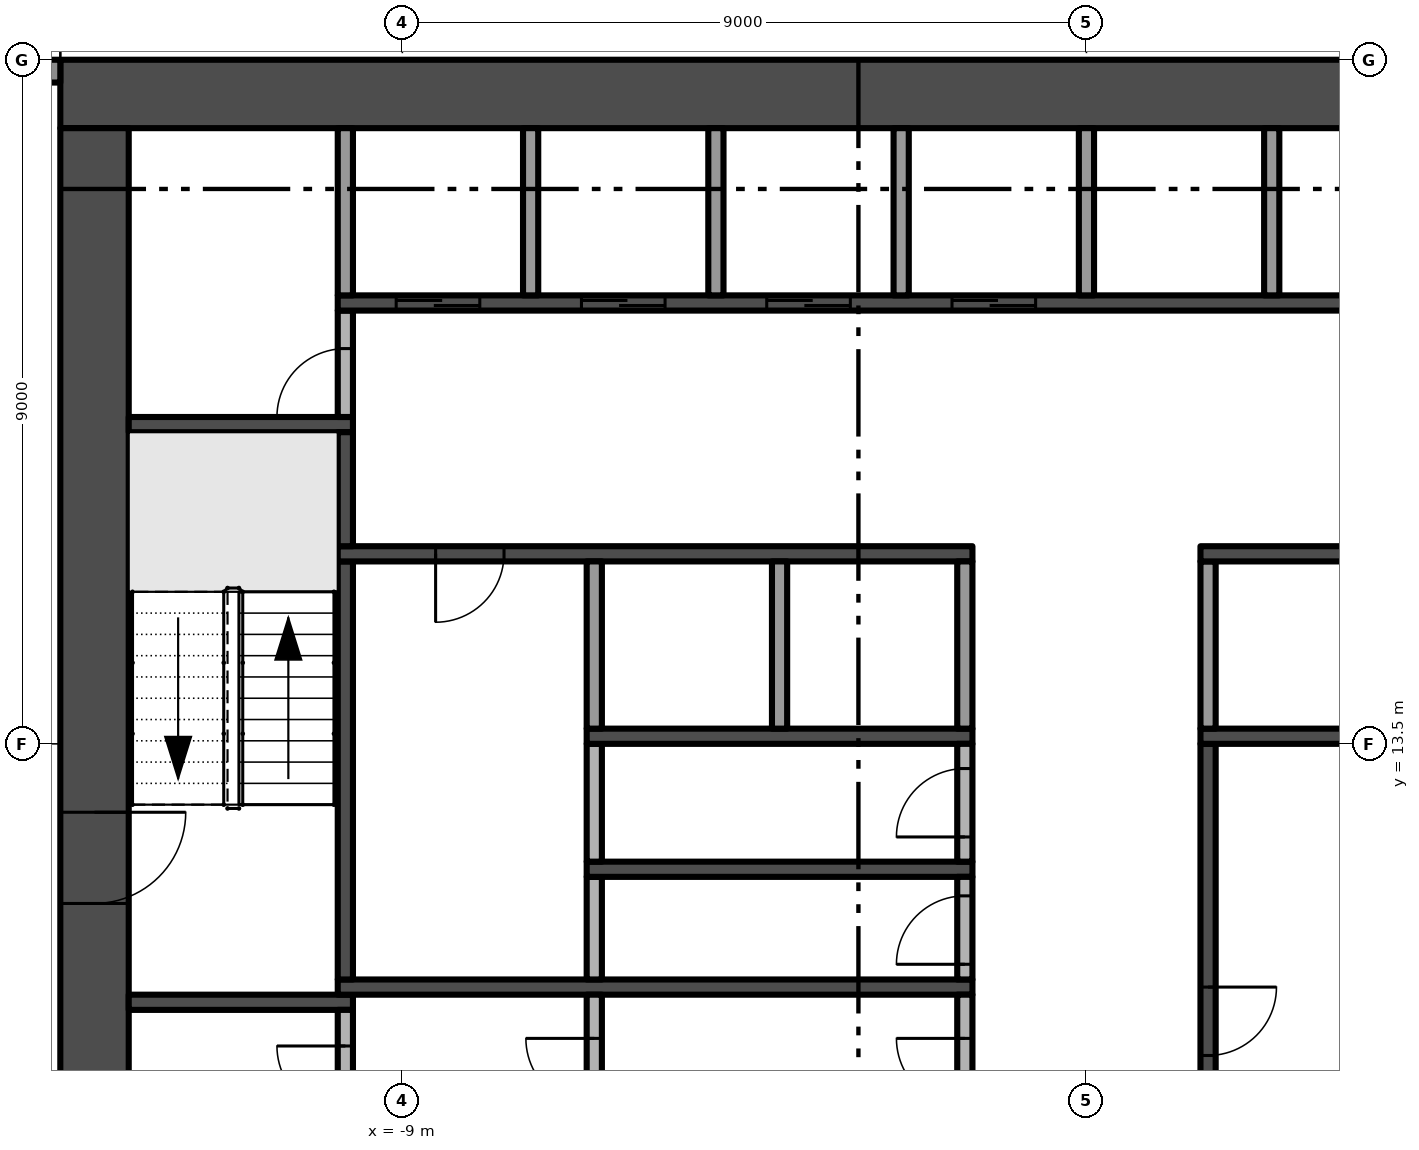
"""IFC4 building model, lengths in metres.
Left out: names, types, materials, properties, quantities, classifications, styles, units other than length and angle.
Written with IfcOpenShell. Run it as: python <this file> out.ifc"""

import sys

from ifc_helpers import new_model, si_unit, direction, frame, frame_2d, origin, place, context, subcontext, project, spatial, rectangle, extrude, element, fill, save


model = new_model("IFC4")
c1 = context("Model", 3, precision=1e-05, world=origin(), true_north=direction((0.0, 1.0)))
c2 = subcontext(c1, "Body", "Model", "MODEL_VIEW")
j1 = project(units=[si_unit("LENGTHUNIT", "METRE"), si_unit("PLANEANGLEUNIT", "RADIAN")], contexts=[c1])
p1 = place(None, origin())
s1 = spatial("IfcSite", under=j1, at=p1, CompositionType="ELEMENT")
p2 = place(p1, origin())
s2 = spatial("IfcBuilding", under=s1, at=p2, CompositionType="ELEMENT")
p3 = place(p2, frame((0.0, 0.0, 88.4)))
s3 = spatial("IfcBuildingStorey", under=s2, at=p3, CompositionType="ELEMENT", Elevation=88.4)
p4 = place(p3, frame((13.5, 22.05, -0.3), z_axis=(0.0, 0.0, 1.0), x_axis=(-1.0, 0.0, 0.0)))
e1 = element("IfcWall", 1, at=p4, inside=s3, PredefinedType="SHEAR", context=c2, shape_type="SweptSolid", body=[
    extrude(rectangle(XDim=27.0, YDim=0.9, at=frame_2d((13.5, 0.0))), origin(), (0.0, 0.0, 1.0), 3.8),
])
p5 = place(p3, frame((-13.05, 21.6, -0.3), z_axis=(0.0, 0.0, 1.0), x_axis=(0.0, -1.0, 0.0)))
e2 = element("IfcWall", 2, at=p5, inside=s3, PredefinedType="SHEAR", context=c2, shape_type="SweptSolid", body=[
    extrude(rectangle(XDim=16.2, YDim=0.9, at=frame_2d((8.1, 0.0))), origin(), (0.0, 0.0, 1.0), 3.8),
])
p6 = place(p5, frame((9.0, 0.0, 0.3)))
e3 = element("IfcOpeningElement", 3, at=p6, cuts=e2, PredefinedType="OPENING", context=c2, shape_type="SweptSolid", body=[
    extrude(rectangle(XDim=1.2, YDim=2.2, at=frame_2d((0.6, 1.1))), frame((0.0, 0.46, 0.0), z_axis=(0.0, -1.0, 0.0), x_axis=(1.0, 0.0, 0.0)), (0.0, 0.0, 1.0), 0.92),
])
p7 = place(p3, frame((-17.35, 22.35, 0.0), z_axis=(0.0, 0.0, 1.0), x_axis=(1.0, 0.0, 0.0)))
e4 = element("IfcWall", 4, at=p7, inside=s3, PredefinedType="SOLIDWALL", context=c2, shape_type="SweptSolid", body=[
    extrude(rectangle(XDim=3.85, YDim=0.3, at=frame_2d((1.925, 0.0))), origin(), (0.0, 0.0, 1.0), 3.5),
])
p8 = place(p7, frame((0.675, 0.0, 0.0)))
e5 = element("IfcOpeningElement", 5, at=p8, cuts=e4, PredefinedType="OPENING", context=c2, shape_type="SweptSolid", body=[
    extrude(rectangle(XDim=2.4, YDim=2.4, at=frame_2d((1.2, 1.2))), frame((0.0, 0.16, 0.0), z_axis=(0.0, -1.0, 0.0), x_axis=(1.0, 0.0, 0.0)), (0.0, 0.0, 1.0), 0.32),
])
for number, where, z_axis, x_axis in (
    (6, (-12.6, 10.1, 0.0), (0.0, 0.0, 1.0), (1.0, 0.0, 0.0)),
    (7, (-12.6, 17.7, 0.0), (0.0, 0.0, 1.0), (1.0, 0.0, 0.0)),
):
    element("IfcWall", number, at=place(p3, frame(where, z_axis=z_axis, x_axis=x_axis)), inside=s3, PredefinedType="SHEAR", context=c2, shape_type="SweptSolid", body=[
        extrude(rectangle(XDim=2.95, YDim=0.2, at=frame_2d((1.475, 0.0))), origin(), (0.0, 0.0, 1.0), 3.5),
    ])
p9 = place(p3, frame((-9.75, 8.15, 0.0), z_axis=(0.0, 0.0, 1.0), x_axis=(0.0, 1.0, 0.0)))
e8 = element("IfcWall", 8, at=p9, inside=s3, PredefinedType="PARTITIONING", context=c2, shape_type="SweptSolid", body=[
    extrude(rectangle(XDim=1.85, YDim=0.2, at=frame_2d((0.925, 0.0))), origin(), (0.0, 0.0, 1.0), 3.5),
])
p10 = place(p9, frame((0.475, 0.0, 0.0)))
e9 = element("IfcOpeningElement", 9, at=p10, cuts=e8, PredefinedType="OPENING", context=c2, shape_type="SweptSolid", body=[
    extrude(rectangle(XDim=0.9, YDim=2.1, at=frame_2d((0.45, 1.05))), frame((0.0, 0.11, 0.0), z_axis=(0.0, -1.0, 0.0), x_axis=(1.0, 0.0, 0.0)), (0.0, 0.0, 1.0), 0.22),
])
p11 = place(p3, frame((-9.85, 10.3, 0.0), z_axis=(0.0, 0.0, 1.0), x_axis=(1.0, 0.0, 0.0)))
e10 = element("IfcWall", 10, at=p11, inside=s3, PredefinedType="SHEAR", context=c2, shape_type="SweptSolid", body=[
    extrude(rectangle(XDim=8.35, YDim=0.2, at=frame_2d((4.175, 0.0))), origin(), (0.0, 0.0, 1.0), 3.5),
])
p12 = place(p3, frame((-9.75, 10.4, 0.0), z_axis=(0.0, 0.0, 1.0), x_axis=(0.0, 1.0, 0.0)))
e11 = element("IfcWall", 11, at=p12, inside=s3, PredefinedType="SHEAR", context=c2, shape_type="SweptSolid", body=[
    extrude(rectangle(XDim=5.5, YDim=0.2, at=frame_2d((2.75, 0.0))), origin(), (0.0, 0.0, 1.0), 3.5),
])
p13 = place(p3, frame((-1.5, 16.0, 0.0), z_axis=(0.0, 0.0, 1.0), x_axis=(-1.0, 0.0, 0.0)))
e12 = element("IfcWall", 12, at=p13, inside=s3, PredefinedType="SHEAR", context=c2, shape_type="SweptSolid", body=[
    extrude(rectangle(XDim=8.35, YDim=0.2, at=frame_2d((4.175, 0.0))), origin(), (0.0, 0.0, 1.0), 3.5),
])
p14 = place(p13, frame((6.162, 0.0, 0.0)))
e13 = element("IfcOpeningElement", 13, at=p14, cuts=e12, PredefinedType="OPENING", context=c2, shape_type="SweptSolid", body=[
    extrude(rectangle(XDim=0.9, YDim=2.1, at=frame_2d((0.45, 1.05))), frame((0.0, 0.11, 0.0), z_axis=(0.0, -1.0, 0.0), x_axis=(1.0, 0.0, 0.0)), (0.0, 0.0, 1.0), 0.22),
])
p15 = place(p3, frame((-9.75, 16.1, 0.0), z_axis=(0.0, 0.0, 1.0), x_axis=(0.0, 1.0, 0.0)))
e14 = element("IfcWall", 14, at=p15, inside=s3, PredefinedType="SHEAR", context=c2, shape_type="SweptSolid", body=[
    extrude(rectangle(XDim=1.5, YDim=0.2, at=frame_2d((0.75, 0.0))), origin(), (0.0, 0.0, 1.0), 3.5),
])
p16 = place(p3, frame((-9.75, 17.8, 0.0), z_axis=(0.0, 0.0, 1.0), x_axis=(0.0, 1.0, 0.0)))
e15 = element("IfcWall", 15, at=p16, inside=s3, PredefinedType="PARTITIONING", context=c2, shape_type="SweptSolid", body=[
    extrude(rectangle(XDim=1.4, YDim=0.2, at=frame_2d((0.7, 0.0))), origin(), (0.0, 0.0, 1.0), 3.5),
])
p17 = place(p16, origin())
e16 = element("IfcOpeningElement", 16, at=p17, cuts=e15, PredefinedType="OPENING", context=c2, shape_type="SweptSolid", body=[
    extrude(rectangle(XDim=0.9, YDim=2.1, at=frame_2d((0.45, 1.05))), frame((0.0, 0.11, 0.0), z_axis=(0.0, -1.0, 0.0), x_axis=(1.0, 0.0, 0.0)), (0.0, 0.0, 1.0), 0.22),
])
p18 = place(p3, frame((-9.85, 19.3, 0.0), z_axis=(0.0, 0.0, 1.0), x_axis=(1.0, 0.0, 0.0)))
e17 = element("IfcWall", 17, at=p18, inside=s3, PredefinedType="SHEAR", context=c2, shape_type="SweptSolid", body=[
    extrude(rectangle(XDim=19.7, YDim=0.2, at=frame_2d((9.85, 0.0))), origin(), (0.0, 0.0, 1.0), 3.5),
])
p19 = place(p18, frame((0.769, 0.0, 0.0)))
e18 = element("IfcOpeningElement", 18, at=p19, cuts=e17, PredefinedType="OPENING", context=c2, shape_type="SweptSolid", body=[
    extrude(rectangle(XDim=1.1, YDim=2.1, at=frame_2d((0.55, 1.05))), frame((0.0, 0.11, 0.0), z_axis=(0.0, -1.0, 0.0), x_axis=(1.0, 0.0, 0.0)), (0.0, 0.0, 1.0), 0.22),
])
p20 = place(p18, frame((3.206, 0.0, 0.0)))
e19 = element("IfcOpeningElement", 19, at=p20, cuts=e17, PredefinedType="OPENING", context=c2, shape_type="SweptSolid", body=[
    extrude(rectangle(XDim=1.1, YDim=2.1, at=frame_2d((0.55, 1.05))), frame((0.0, 0.11, 0.0), z_axis=(0.0, -1.0, 0.0), x_axis=(1.0, 0.0, 0.0)), (0.0, 0.0, 1.0), 0.22),
])
p21 = place(p18, frame((5.644, 0.0, 0.0)))
e20 = element("IfcOpeningElement", 20, at=p21, cuts=e17, PredefinedType="OPENING", context=c2, shape_type="SweptSolid", body=[
    extrude(rectangle(XDim=1.1, YDim=2.1, at=frame_2d((0.55, 1.05))), frame((0.0, 0.11, 0.0), z_axis=(0.0, -1.0, 0.0), x_axis=(1.0, 0.0, 0.0)), (0.0, 0.0, 1.0), 0.22),
])
p22 = place(p18, frame((8.081, 0.0, 0.0)))
e21 = element("IfcOpeningElement", 21, at=p22, cuts=e17, PredefinedType="OPENING", context=c2, shape_type="SweptSolid", body=[
    extrude(rectangle(XDim=1.1, YDim=2.1, at=frame_2d((0.55, 1.05))), frame((0.0, 0.11, 0.0), z_axis=(0.0, -1.0, 0.0), x_axis=(1.0, 0.0, 0.0)), (0.0, 0.0, 1.0), 0.22),
])
for number, where, z_axis, x_axis in (
    (22, (-9.75, 19.4, 0.0), (0.0, 0.0, 1.0), (0.0, 1.0, 0.0)),
    (23, (-7.312, 19.4, 0.0), (0.0, 0.0, 1.0), (0.0, 1.0, 0.0)),
):
    element("IfcWall", number, at=place(p3, frame(where, z_axis=z_axis, x_axis=x_axis)), inside=s3, PredefinedType="PARTITIONING", context=c2, shape_type="SweptSolid", body=[
        extrude(rectangle(XDim=2.2, YDim=0.2, at=frame_2d((1.1, 0.0))), origin(), (0.0, 0.0, 1.0), 3.5),
    ])
p23 = place(p3, frame((-6.475, 8.15, 0.0), z_axis=(0.0, 0.0, 1.0), x_axis=(0.0, 1.0, 0.0)))
e24 = element("IfcWall", 24, at=p23, inside=s3, PredefinedType="PARTITIONING", context=c2, shape_type="SweptSolid", body=[
    extrude(rectangle(XDim=2.05, YDim=0.2, at=frame_2d((1.025, 0.0))), origin(), (0.0, 0.0, 1.0), 3.5),
])
p24 = place(p23, frame((0.575, 0.0, 0.0)))
e25 = element("IfcOpeningElement", 25, at=p24, cuts=e24, PredefinedType="OPENING", context=c2, shape_type="SweptSolid", body=[
    extrude(rectangle(XDim=0.9, YDim=2.1, at=frame_2d((0.45, 1.05))), frame((0.0, 0.11, 0.0), z_axis=(0.0, -1.0, 0.0), x_axis=(1.0, 0.0, 0.0)), (0.0, 0.0, 1.0), 0.22),
])
p25 = place(p3, frame((-6.475, 10.4, 0.0), z_axis=(0.0, 0.0, 1.0), x_axis=(0.0, 1.0, 0.0)))
e26 = element("IfcWall", 26, at=p25, inside=s3, PredefinedType="PARTITIONING", context=c2, shape_type="SweptSolid", body=[
    extrude(rectangle(XDim=1.35, YDim=0.2, at=frame_2d((0.675, 0.0))), origin(), (0.0, 0.0, 1.0), 3.5),
])
p26 = place(p3, frame((-6.575, 11.85, 0.0), z_axis=(0.0, 0.0, 1.0), x_axis=(1.0, 0.0, 0.0)))
e27 = element("IfcWall", 27, at=p26, inside=s3, PredefinedType="SHEAR", context=c2, shape_type="SweptSolid", body=[
    extrude(rectangle(XDim=5.075, YDim=0.2, at=frame_2d((2.538, 0.0))), origin(), (0.0, 0.0, 1.0), 3.5),
])
p27 = place(p3, frame((-6.475, 11.95, 0.0), z_axis=(0.0, 0.0, 1.0), x_axis=(0.0, 1.0, 0.0)))
e28 = element("IfcWall", 28, at=p27, inside=s3, PredefinedType="PARTITIONING", context=c2, shape_type="SweptSolid", body=[
    extrude(rectangle(XDim=1.55, YDim=0.2, at=frame_2d((0.775, 0.0))), origin(), (0.0, 0.0, 1.0), 3.5),
])
p28 = place(p3, frame((-6.575, 13.6, 0.0), z_axis=(0.0, 0.0, 1.0), x_axis=(1.0, 0.0, 0.0)))
e29 = element("IfcWall", 29, at=p28, inside=s3, PredefinedType="SHEAR", context=c2, shape_type="SweptSolid", body=[
    extrude(rectangle(XDim=5.075, YDim=0.2, at=frame_2d((2.538, 0.0))), origin(), (0.0, 0.0, 1.0), 3.5),
])
for number, where, z_axis, x_axis in (
    (30, (-6.475, 13.7, 0.0), (0.0, 0.0, 1.0), (0.0, 1.0, 0.0)),
    (31, (-4.875, 19.4, 0.0), (0.0, 0.0, 1.0), (0.0, 1.0, 0.0)),
    (32, (-4.037, 13.7, 0.0), (0.0, 0.0, 1.0), (0.0, 1.0, 0.0)),
    (33, (-2.438, 19.4, 0.0), (0.0, 0.0, 1.0), (0.0, 1.0, 0.0)),
):
    element("IfcWall", number, at=place(p3, frame(where, z_axis=z_axis, x_axis=x_axis)), inside=s3, PredefinedType="PARTITIONING", context=c2, shape_type="SweptSolid", body=[
        extrude(rectangle(XDim=2.2, YDim=0.2, at=frame_2d((1.1, 0.0))), origin(), (0.0, 0.0, 1.0), 3.5),
    ])
p29 = place(p3, frame((-1.6, 8.15, 0.0), z_axis=(0.0, 0.0, 1.0), x_axis=(0.0, 1.0, 0.0)))
e34 = element("IfcWall", 34, at=p29, inside=s3, PredefinedType="PARTITIONING", context=c2, shape_type="SweptSolid", body=[
    extrude(rectangle(XDim=2.05, YDim=0.2, at=frame_2d((1.025, 0.0))), origin(), (0.0, 0.0, 1.0), 3.5),
])
p30 = place(p29, frame((0.575, 0.0, 0.0)))
e35 = element("IfcOpeningElement", 35, at=p30, cuts=e34, PredefinedType="OPENING", context=c2, shape_type="SweptSolid", body=[
    extrude(rectangle(XDim=0.9, YDim=2.1, at=frame_2d((0.45, 1.05))), frame((0.0, 0.11, 0.0), z_axis=(0.0, -1.0, 0.0), x_axis=(1.0, 0.0, 0.0)), (0.0, 0.0, 1.0), 0.22),
])
p31 = place(p3, frame((-1.6, 10.4, 0.0), z_axis=(0.0, 0.0, 1.0), x_axis=(0.0, 1.0, 0.0)))
e36 = element("IfcWall", 36, at=p31, inside=s3, PredefinedType="PARTITIONING", context=c2, shape_type="SweptSolid", body=[
    extrude(rectangle(XDim=1.35, YDim=0.2, at=frame_2d((0.675, 0.0))), origin(), (0.0, 0.0, 1.0), 3.5),
])
p32 = place(p31, frame((0.2, 0.0, 0.0)))
e37 = element("IfcOpeningElement", 37, at=p32, cuts=e36, PredefinedType="OPENING", context=c2, shape_type="SweptSolid", body=[
    extrude(rectangle(XDim=0.9, YDim=2.1, at=frame_2d((0.45, 1.05))), frame((0.0, 0.11, 0.0), z_axis=(0.0, -1.0, 0.0), x_axis=(1.0, 0.0, 0.0)), (0.0, 0.0, 1.0), 0.22),
])
p33 = place(p3, frame((-1.6, 11.95, 0.0), z_axis=(0.0, 0.0, 1.0), x_axis=(0.0, 1.0, 0.0)))
e38 = element("IfcWall", 38, at=p33, inside=s3, PredefinedType="PARTITIONING", context=c2, shape_type="SweptSolid", body=[
    extrude(rectangle(XDim=1.55, YDim=0.2, at=frame_2d((0.775, 0.0))), origin(), (0.0, 0.0, 1.0), 3.5),
])
p34 = place(p33, frame((0.325, 0.0, 0.0)))
e39 = element("IfcOpeningElement", 39, at=p34, cuts=e38, PredefinedType="OPENING", context=c2, shape_type="SweptSolid", body=[
    extrude(rectangle(XDim=0.9, YDim=2.1, at=frame_2d((0.45, 1.05))), frame((0.0, 0.11, 0.0), z_axis=(0.0, -1.0, 0.0), x_axis=(1.0, 0.0, 0.0)), (0.0, 0.0, 1.0), 0.22),
])
for number, where, z_axis, x_axis in (
    (40, (-1.6, 13.7, 0.0), (0.0, 0.0, 1.0), (0.0, 1.0, 0.0)),
    (41, (0.0, 19.4, 0.0), (0.0, 0.0, 1.0), (0.0, 1.0, 0.0)),
):
    element("IfcWall", number, at=place(p3, frame(where, z_axis=z_axis, x_axis=x_axis)), inside=s3, PredefinedType="PARTITIONING", context=c2, shape_type="SweptSolid", body=[
        extrude(rectangle(XDim=2.2, YDim=0.2, at=frame_2d((1.1, 0.0))), origin(), (0.0, 0.0, 1.0), 3.5),
    ])
p35 = place(p3, frame((1.6, 13.5, 0.0), z_axis=(0.0, 0.0, 1.0), x_axis=(0.0, -1.0, 0.0)))
e42 = element("IfcWall", 42, at=p35, inside=s3, PredefinedType="SHEAR", context=c2, shape_type="SweptSolid", body=[
    extrude(rectangle(XDim=8.1, YDim=0.2, at=frame_2d((4.05, 0.0))), origin(), (0.0, 0.0, 1.0), 3.5),
])
p36 = place(p35, frame((3.2, 0.0, 0.0)))
e43 = element("IfcOpeningElement", 43, at=p36, cuts=e42, PredefinedType="OPENING", context=c2, shape_type="SweptSolid", body=[
    extrude(rectangle(XDim=0.9, YDim=2.1, at=frame_2d((0.45, 1.05))), frame((0.0, 0.11, 0.0), z_axis=(0.0, -1.0, 0.0), x_axis=(1.0, 0.0, 0.0)), (0.0, 0.0, 1.0), 0.22),
])
p37 = place(p3, frame((1.5, 13.6, 0.0), z_axis=(0.0, 0.0, 1.0), x_axis=(1.0, 0.0, 0.0)))
e44 = element("IfcWall", 44, at=p37, inside=s3, PredefinedType="SHEAR", context=c2, shape_type="SweptSolid", body=[
    extrude(rectangle(XDim=5.075, YDim=0.2, at=frame_2d((2.538, 0.0))), origin(), (0.0, 0.0, 1.0), 3.5),
])
p38 = place(p3, frame((1.6, 13.7, 0.0), z_axis=(0.0, 0.0, 1.0), x_axis=(0.0, 1.0, 0.0)))
e45 = element("IfcWall", 45, at=p38, inside=s3, PredefinedType="PARTITIONING", context=c2, shape_type="SweptSolid", body=[
    extrude(rectangle(XDim=2.2, YDim=0.2, at=frame_2d((1.1, 0.0))), origin(), (0.0, 0.0, 1.0), 3.5),
])
p39 = place(p3, frame((9.85, 16.0, 0.0), z_axis=(0.0, 0.0, 1.0), x_axis=(-1.0, 0.0, 0.0)))
e46 = element("IfcWall", 46, at=p39, inside=s3, PredefinedType="SHEAR", context=c2, shape_type="SweptSolid", body=[
    extrude(rectangle(XDim=8.35, YDim=0.2, at=frame_2d((4.175, 0.0))), origin(), (0.0, 0.0, 1.0), 3.5),
])
p40 = place(p39, frame((1.288, 0.0, 0.0)))
e47 = element("IfcOpeningElement", 47, at=p40, cuts=e46, PredefinedType="OPENING", context=c2, shape_type="SweptSolid", body=[
    extrude(rectangle(XDim=0.9, YDim=2.1, at=frame_2d((0.45, 1.05))), frame((0.0, 0.11, 0.0), z_axis=(0.0, -1.0, 0.0), x_axis=(1.0, 0.0, 0.0)), (0.0, 0.0, 1.0), 0.22),
])
p41 = place(p3, frame((2.438, 19.4, 0.0), z_axis=(0.0, 0.0, 1.0), x_axis=(0.0, 1.0, 0.0)))
e48 = element("IfcWall", 48, at=p41, inside=s3, PredefinedType="PARTITIONING", context=c2, shape_type="SweptSolid", body=[
    extrude(rectangle(XDim=2.2, YDim=0.2, at=frame_2d((1.1, 0.0))), origin(), (0.0, 0.0, 1.0), 3.5),
])
p42 = place(p6, frame((1.2, 0.0, 0.0), z_axis=(0.0, 0.0, 1.0), x_axis=(-1.0, 0.0, 0.0)))
e49 = element("IfcDoor", 49, at=p42, inside=s3, OperationType="SINGLE_SWING_RIGHT", PredefinedType="DOOR", context=c2, shape_type="SweptSolid", body=[
    extrude(rectangle(XDim=1.2, YDim=2.2, at=frame_2d((0.6, 1.1))), frame((0.0, 0.025, 0.0), z_axis=(0.0, -1.0, 0.0), x_axis=(1.0, 0.0, 0.0)), (0.0, 0.0, 1.0), 0.05),
])
fill(e3, e49)
p43 = place(p19, origin())
e50 = element("IfcDoor", 50, at=p43, inside=s3, OperationType="SLIDING_TO_LEFT", PredefinedType="DOOR", context=c2, shape_type="SweptSolid", body=[
    extrude(rectangle(XDim=1.1, YDim=2.1, at=frame_2d((0.55, 1.05))), frame((0.0, 0.025, 0.0), z_axis=(0.0, -1.0, 0.0), x_axis=(1.0, 0.0, 0.0)), (0.0, 0.0, 1.0), 0.05),
])
fill(e18, e50)
p44 = place(p20, origin())
e51 = element("IfcDoor", 51, at=p44, inside=s3, OperationType="SLIDING_TO_LEFT", PredefinedType="DOOR", context=c2, shape_type="SweptSolid", body=[
    extrude(rectangle(XDim=1.1, YDim=2.1, at=frame_2d((0.55, 1.05))), frame((0.0, 0.025, 0.0), z_axis=(0.0, -1.0, 0.0), x_axis=(1.0, 0.0, 0.0)), (0.0, 0.0, 1.0), 0.05),
])
fill(e19, e51)
p45 = place(p21, origin())
e52 = element("IfcDoor", 52, at=p45, inside=s3, OperationType="SLIDING_TO_LEFT", PredefinedType="DOOR", context=c2, shape_type="SweptSolid", body=[
    extrude(rectangle(XDim=1.1, YDim=2.1, at=frame_2d((0.55, 1.05))), frame((0.0, 0.025, 0.0), z_axis=(0.0, -1.0, 0.0), x_axis=(1.0, 0.0, 0.0)), (0.0, 0.0, 1.0), 0.05),
])
fill(e20, e52)
p46 = place(p22, origin())
e53 = element("IfcDoor", 53, at=p46, inside=s3, OperationType="SLIDING_TO_LEFT", PredefinedType="DOOR", context=c2, shape_type="SweptSolid", body=[
    extrude(rectangle(XDim=1.1, YDim=2.1, at=frame_2d((0.55, 1.05))), frame((0.0, 0.025, 0.0), z_axis=(0.0, -1.0, 0.0), x_axis=(1.0, 0.0, 0.0)), (0.0, 0.0, 1.0), 0.05),
])
fill(e21, e53)
p47 = place(p14, origin())
e54 = element("IfcDoor", 54, at=p47, inside=s3, OperationType="SINGLE_SWING_RIGHT", PredefinedType="DOOR", context=c2, shape_type="SweptSolid", body=[
    extrude(rectangle(XDim=0.9, YDim=2.1, at=frame_2d((0.45, 1.05))), frame((0.0, 0.025, 0.0), z_axis=(0.0, -1.0, 0.0), x_axis=(1.0, 0.0, 0.0)), (0.0, 0.0, 1.0), 0.05),
])
fill(e13, e54)
p48 = place(p30, origin())
e55 = element("IfcDoor", 55, at=p48, inside=s3, OperationType="SINGLE_SWING_RIGHT", PredefinedType="DOOR", context=c2, shape_type="SweptSolid", body=[
    extrude(rectangle(XDim=0.9, YDim=2.1, at=frame_2d((0.45, 1.05))), frame((0.0, 0.025, 0.0), z_axis=(0.0, -1.0, 0.0), x_axis=(1.0, 0.0, 0.0)), (0.0, 0.0, 1.0), 0.05),
])
fill(e35, e55)
p49 = place(p32, origin())
e56 = element("IfcDoor", 56, at=p49, inside=s3, OperationType="SINGLE_SWING_LEFT", PredefinedType="DOOR", context=c2, shape_type="SweptSolid", body=[
    extrude(rectangle(XDim=0.9, YDim=2.1, at=frame_2d((0.45, 1.05))), frame((0.0, 0.025, 0.0), z_axis=(0.0, -1.0, 0.0), x_axis=(1.0, 0.0, 0.0)), (0.0, 0.0, 1.0), 0.05),
])
fill(e37, e56)
p50 = place(p34, origin())
e57 = element("IfcDoor", 57, at=p50, inside=s3, OperationType="SINGLE_SWING_LEFT", PredefinedType="DOOR", context=c2, shape_type="SweptSolid", body=[
    extrude(rectangle(XDim=0.9, YDim=2.1, at=frame_2d((0.45, 1.05))), frame((0.0, 0.025, 0.0), z_axis=(0.0, -1.0, 0.0), x_axis=(1.0, 0.0, 0.0)), (0.0, 0.0, 1.0), 0.05),
])
fill(e39, e57)
p51 = place(p36, origin())
e58 = element("IfcDoor", 58, at=p51, inside=s3, OperationType="SINGLE_SWING_LEFT", PredefinedType="DOOR", context=c2, shape_type="SweptSolid", body=[
    extrude(rectangle(XDim=0.9, YDim=2.1, at=frame_2d((0.45, 1.05))), frame((0.0, 0.025, 0.0), z_axis=(0.0, -1.0, 0.0), x_axis=(1.0, 0.0, 0.0)), (0.0, 0.0, 1.0), 0.05),
])
fill(e43, e58)
p52 = place(p17, origin())
e59 = element("IfcDoor", 59, at=p52, inside=s3, OperationType="SINGLE_SWING_LEFT", PredefinedType="DOOR", context=c2, shape_type="SweptSolid", body=[
    extrude(rectangle(XDim=0.9, YDim=2.1, at=frame_2d((0.45, 1.05))), frame((0.0, 0.025, 0.0), z_axis=(0.0, -1.0, 0.0), x_axis=(1.0, 0.0, 0.0)), (0.0, 0.0, 1.0), 0.05),
])
fill(e16, e59)
p53 = place(p24, origin())
e60 = element("IfcDoor", 60, at=p53, inside=s3, OperationType="SINGLE_SWING_RIGHT", PredefinedType="DOOR", context=c2, shape_type="SweptSolid", body=[
    extrude(rectangle(XDim=0.9, YDim=2.1, at=frame_2d((0.45, 1.05))), frame((0.0, 0.025, 0.0), z_axis=(0.0, -1.0, 0.0), x_axis=(1.0, 0.0, 0.0)), (0.0, 0.0, 1.0), 0.05),
])
fill(e25, e60)
p54 = place(p10, origin())
e61 = element("IfcDoor", 61, at=p54, inside=s3, OperationType="SINGLE_SWING_RIGHT", PredefinedType="DOOR", context=c2, shape_type="SweptSolid", body=[
    extrude(rectangle(XDim=0.9, YDim=2.1, at=frame_2d((0.45, 1.05))), frame((0.0, 0.025, 0.0), z_axis=(0.0, -1.0, 0.0), x_axis=(1.0, 0.0, 0.0)), (0.0, 0.0, 1.0), 0.05),
])
fill(e9, e61)
save(model, sys.argv[1])
